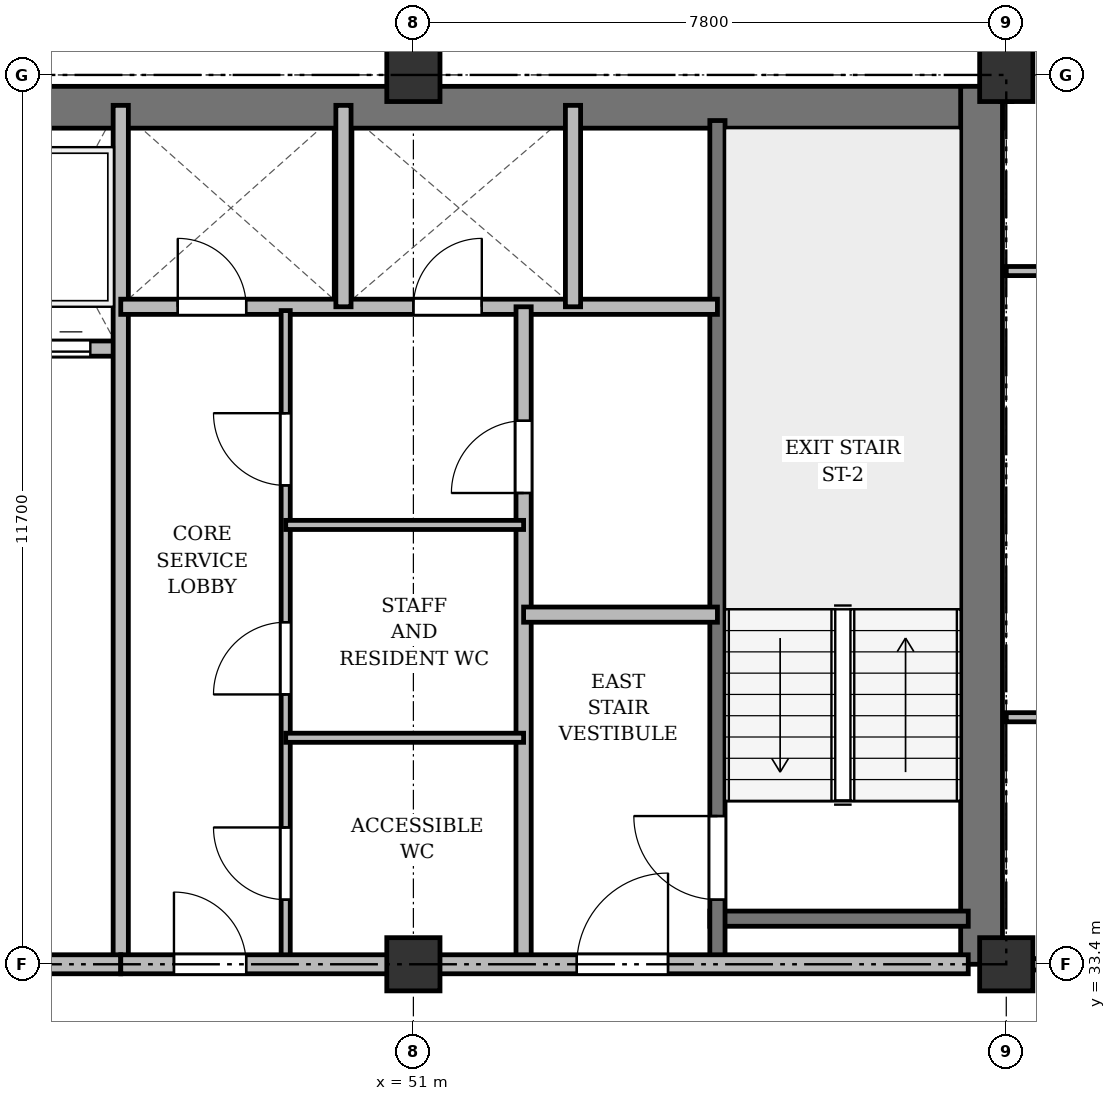
"""IFC4 building model, lengths in metres.
Left out: names, types, materials, properties, quantities, classifications, styles, units other than length and angle.
Written with IfcOpenShell. Run it as: python <this file> out.ifc"""

import sys

from ifc_helpers import new_model, si_unit, direction, frame, frame_2d, origin, origin_2d, place, context, subcontext, project, spatial, rectangle, extrude, source, transform, mapped, element, fill, save


model = new_model("IFC4")
c1 = context("Model", 3, precision=1e-05, world=origin(), true_north=direction((0.0, 1.0)))
c2 = subcontext(c1, "Body", "Model", "MODEL_VIEW")
j1 = project(units=[si_unit("LENGTHUNIT", "METRE"), si_unit("PLANEANGLEUNIT", "RADIAN")], contexts=[c1])
p1 = place(None, origin())
s1 = spatial("IfcSite", under=j1, at=p1, CompositionType="ELEMENT")
p2 = place(p1, origin())
s2 = spatial("IfcBuilding", under=s1, at=p2, CompositionType="ELEMENT")
p3 = place(p2, frame((0.0, 0.0, 219.3)))
s3 = spatial("IfcBuildingStorey", under=s2, at=p3, CompositionType="ELEMENT", Elevation=219.3)
m1 = source(origin(), c2, "Body", "SweptSolid", [
    extrude(rectangle(XDim=0.7, YDim=0.7, at=origin_2d()), origin(), (0.0, 0.0, 1.0), 3.6),
])
for number, where, z_axis, x_axis in (
    (1, (51.0, 33.4, 0.0), (0.0, 0.0, 1.0), (1.0, 0.0, 0.0)),
    (2, (51.0, 45.1, 0.0), (0.0, 0.0, 1.0), (1.0, 0.0, 0.0)),
    (3, (58.8, 33.4, 0.0), (0.0, 0.0, 1.0), (1.0, 0.0, 0.0)),
    (4, (58.8, 45.1, 0.0), (0.0, 0.0, 1.0), (1.0, 0.0, 0.0)),
):
    element("IfcColumn", number, at=place(p3, frame(where, z_axis=z_axis, x_axis=x_axis)), inside=s3, PredefinedType="COLUMN", context=c2, shape_type="MappedRepresentation", body=[
        mapped(m1, transform((0.0, 0.0, 0.0), x_axis=(1.0, 0.0, 0.0), y_axis=(0.0, 1.0, 0.0), z_axis=(0.0, 0.0, 1.0), scale=1.0)),
    ])
p4 = place(p3, frame((15.65, 44.675, 0.0), z_axis=(0.0, 0.0, 1.0), x_axis=(1.0, 0.0, 0.0)))
e5 = element("IfcWall", 5, at=p4, inside=s3, PredefinedType="SHEAR", context=c2, shape_type="SweptSolid", body=[
    extrude(rectangle(XDim=43.1, YDim=0.55, at=frame_2d((21.55, 0.0))), origin(), (0.0, 0.0, 1.0), 3.36),
])
p5 = place(p3, frame((58.475, 33.4, 0.0), z_axis=(0.0, 0.0, 1.0), x_axis=(0.0, 1.0, 0.0)))
e6 = element("IfcWall", 6, at=p5, inside=s3, PredefinedType="SHEAR", context=c2, shape_type="SweptSolid", body=[
    extrude(rectangle(XDim=11.55, YDim=0.55, at=frame_2d((5.775, 0.0))), origin(), (0.0, 0.0, 1.0), 3.36),
])
p6 = place(p3, frame((54.9, 34.0, 0.0), z_axis=(0.0, 0.0, 1.0), x_axis=(1.0, 0.0, 0.0)))
e7 = element("IfcWall", 7, at=p6, inside=s3, PredefinedType="SHEAR", context=c2, shape_type="SweptSolid", body=[
    extrude(rectangle(XDim=3.4, YDim=0.2, at=frame_2d((1.7, 0.0))), origin(), (0.0, 0.0, 1.0), 3.36),
])
p7 = place(p3, frame((55.0, 33.4, 0.0), z_axis=(0.0, 0.0, 1.0), x_axis=(0.0, 1.0, 0.0)))
e8 = element("IfcWall", 8, at=p7, inside=s3, PredefinedType="SHEAR", context=c2, shape_type="SweptSolid", body=[
    extrude(rectangle(XDim=11.1, YDim=0.2, at=frame_2d((5.55, 0.0))), origin(), (0.0, 0.0, 1.0), 3.36),
])
p8 = place(p7, frame((0.85, 0.0, 0.0)))
e9 = element("IfcOpeningElement", 9, at=p8, cuts=e8, PredefinedType="OPENING", context=c2, shape_type="SweptSolid", body=[
    extrude(rectangle(XDim=1.1, YDim=2.15, at=frame_2d((0.55, 1.075))), frame((0.0, 0.11, 0.0), z_axis=(0.0, -1.0, 0.0), x_axis=(1.0, 0.0, 0.0)), (0.0, 0.0, 1.0), 0.22),
])
p9 = place(p3, frame((40.25, 41.5, 0.0), z_axis=(0.0, 0.0, 1.0), x_axis=(1.0, 0.0, 0.0)))
e10 = element("IfcWall", 10, at=p9, inside=s3, PredefinedType="SOLIDWALL", context=c2, shape_type="SweptSolid", body=[
    extrude(rectangle(XDim=6.9, YDim=0.2, at=frame_2d((3.45, 0.0))), origin(), (0.0, 0.0, 1.0), 3.36),
])
p10 = place(p9, frame((0.35, 0.0, 0.0)))
e11 = element("IfcOpeningElement", 11, at=p10, cuts=e10, PredefinedType="OPENING", context=c2, shape_type="SweptSolid", body=[
    extrude(rectangle(XDim=1.05, YDim=2.15, at=frame_2d((0.525, 1.075))), frame((0.0, 0.11, 0.0), z_axis=(0.0, -1.0, 0.0), x_axis=(1.0, 0.0, 0.0)), (0.0, 0.0, 1.0), 0.22),
])
p11 = place(p9, frame((2.05, 0.0, 0.0)))
e12 = element("IfcOpeningElement", 12, at=p11, cuts=e10, PredefinedType="OPENING", context=c2, shape_type="SweptSolid", body=[
    extrude(rectangle(XDim=1.05, YDim=2.15, at=frame_2d((0.525, 1.075))), frame((0.0, 0.11, 0.0), z_axis=(0.0, -1.0, 0.0), x_axis=(1.0, 0.0, 0.0)), (0.0, 0.0, 1.0), 0.22),
])
p12 = place(p9, frame((3.75, 0.0, 0.0)))
e13 = element("IfcOpeningElement", 13, at=p12, cuts=e10, PredefinedType="OPENING", context=c2, shape_type="SweptSolid", body=[
    extrude(rectangle(XDim=1.05, YDim=2.15, at=frame_2d((0.525, 1.075))), frame((0.0, 0.11, 0.0), z_axis=(0.0, -1.0, 0.0), x_axis=(1.0, 0.0, 0.0)), (0.0, 0.0, 1.0), 0.22),
])
p13 = place(p9, frame((5.45, 0.0, 0.0)))
e14 = element("IfcOpeningElement", 14, at=p13, cuts=e10, PredefinedType="OPENING", context=c2, shape_type="SweptSolid", body=[
    extrude(rectangle(XDim=1.05, YDim=2.15, at=frame_2d((0.525, 1.075))), frame((0.0, 0.11, 0.0), z_axis=(0.0, -1.0, 0.0), x_axis=(1.0, 0.0, 0.0)), (0.0, 0.0, 1.0), 0.22),
])
p14 = place(p3, frame((47.15, 33.4, 0.0), z_axis=(0.0, 0.0, 1.0), x_axis=(0.0, 1.0, 0.0)))
e15 = element("IfcWall", 15, at=p14, inside=s3, PredefinedType="SOLIDWALL", context=c2, shape_type="SweptSolid", body=[
    extrude(rectangle(XDim=11.3, YDim=0.2, at=frame_2d((5.65, 0.0))), origin(), (0.0, 0.0, 1.0), 2.91),
])
p15 = place(p3, frame((33.3, 33.4, 0.0), z_axis=(0.0, 0.0, 1.0), x_axis=(1.0, 0.0, 0.0)))
e16 = element("IfcWall", 16, at=p15, inside=s3, PredefinedType="PARTITIONING", context=c2, shape_type="SweptSolid", body=[
    extrude(rectangle(XDim=13.85, YDim=0.25, at=frame_2d((6.925, 0.0))), origin(), (0.0, 0.0, 1.0), 2.91),
])
p16 = place(p15, frame((4.2, 0.0, 0.0)))
e17 = element("IfcOpeningElement", 17, at=p16, cuts=e16, PredefinedType="OPENING", context=c2, shape_type="SweptSolid", body=[
    extrude(rectangle(XDim=1.6, YDim=2.2, at=frame_2d((0.8, 1.1))), frame((0.0, 0.135, 0.0), z_axis=(0.0, -1.0, 0.0), x_axis=(1.0, 0.0, 0.0)), (0.0, 0.0, 1.0), 0.27),
])
p17 = place(p3, frame((47.15, 42.05, 0.0), z_axis=(0.0, 0.0, 1.0), x_axis=(1.0, 0.0, 0.0)))
e18 = element("IfcWall", 18, at=p17, inside=s3, PredefinedType="SOLIDWALL", context=c2, shape_type="SweptSolid", body=[
    extrude(rectangle(XDim=7.85, YDim=0.2, at=frame_2d((3.925, 0.0))), origin(), (0.0, 0.0, 1.0), 2.86),
])
p18 = place(p17, frame((0.75, 0.0, 0.0)))
e19 = element("IfcOpeningElement", 19, at=p18, cuts=e18, PredefinedType="OPENING", context=c2, shape_type="SweptSolid", body=[
    extrude(rectangle(XDim=0.9, YDim=2.1, at=frame_2d((0.45, 1.05))), frame((0.0, 0.11, 0.0), z_axis=(0.0, -1.0, 0.0), x_axis=(1.0, 0.0, 0.0)), (0.0, 0.0, 1.0), 0.22),
])
p19 = place(p17, frame((3.85, 0.0, 0.0)))
e20 = element("IfcOpeningElement", 20, at=p19, cuts=e18, PredefinedType="OPENING", context=c2, shape_type="SweptSolid", body=[
    extrude(rectangle(XDim=0.9, YDim=2.1, at=frame_2d((0.45, 1.05))), frame((0.0, 0.11, 0.0), z_axis=(0.0, -1.0, 0.0), x_axis=(1.0, 0.0, 0.0)), (0.0, 0.0, 1.0), 0.22),
])
for number, where, z_axis, x_axis in (
    (21, (50.08, 42.05, 0.0), (0.0, 0.0, 1.0), (0.0, 1.0, 0.0)),
    (22, (53.1, 42.05, 0.0), (0.0, 0.0, 1.0), (0.0, 1.0, 0.0)),
):
    element("IfcWall", number, at=place(p3, frame(where, z_axis=z_axis, x_axis=x_axis)), inside=s3, PredefinedType="SOLIDWALL", context=c2, shape_type="SweptSolid", body=[
        extrude(rectangle(XDim=2.65, YDim=0.2, at=frame_2d((1.325, 0.0))), origin(), (0.0, 0.0, 1.0), 3.36),
    ])
p20 = place(p3, frame((52.45, 33.4, 0.0), z_axis=(0.0, 0.0, 1.0), x_axis=(0.0, 1.0, 0.0)))
e23 = element("IfcWall", 23, at=p20, inside=s3, PredefinedType="PARTITIONING", context=c2, shape_type="SweptSolid", body=[
    extrude(rectangle(XDim=8.65, YDim=0.2, at=frame_2d((4.325, 0.0))), origin(), (0.0, 0.0, 1.0), 2.91),
])
p21 = place(p20, frame((6.2, 0.0, 0.0)))
e24 = element("IfcOpeningElement", 24, at=p21, cuts=e23, PredefinedType="OPENING", context=c2, shape_type="SweptSolid", body=[
    extrude(rectangle(XDim=0.95, YDim=2.15, at=frame_2d((0.475, 1.075))), frame((0.0, 0.11, 0.0), z_axis=(0.0, -1.0, 0.0), x_axis=(1.0, 0.0, 0.0)), (0.0, 0.0, 1.0), 0.22),
])
p22 = place(p3, frame((52.45, 38.0, 0.0), z_axis=(0.0, 0.0, 1.0), x_axis=(1.0, 0.0, 0.0)))
e25 = element("IfcWall", 25, at=p22, inside=s3, PredefinedType="PARTITIONING", context=c2, shape_type="SweptSolid", body=[
    extrude(rectangle(XDim=2.55, YDim=0.2, at=frame_2d((1.275, 0.0))), origin(), (0.0, 0.0, 1.0), 3.36),
])
p23 = place(p3, frame((49.32, 33.4, 0.0), z_axis=(0.0, 0.0, 1.0), x_axis=(0.0, 1.0, 0.0)))
e26 = element("IfcWall", 26, at=p23, inside=s3, PredefinedType="PARTITIONING", context=c2, shape_type="SweptSolid", body=[
    extrude(rectangle(XDim=8.6, YDim=0.12, at=frame_2d((4.3, 0.0))), origin(), (0.0, 0.0, 1.0), 2.91),
])
p24 = place(p23, frame((0.85, 0.0, 0.0)))
e27 = element("IfcOpeningElement", 27, at=p24, cuts=e26, PredefinedType="OPENING", context=c2, shape_type="SweptSolid", body=[
    extrude(rectangle(XDim=0.95, YDim=2.15, at=frame_2d((0.475, 1.075))), frame((0.0, 0.07, 0.0), z_axis=(0.0, -1.0, 0.0), x_axis=(1.0, 0.0, 0.0)), (0.0, 0.0, 1.0), 0.14),
])
p25 = place(p23, frame((3.55, 0.0, 0.0)))
e28 = element("IfcOpeningElement", 28, at=p25, cuts=e26, PredefinedType="OPENING", context=c2, shape_type="SweptSolid", body=[
    extrude(rectangle(XDim=0.95, YDim=2.15, at=frame_2d((0.475, 1.075))), frame((0.0, 0.07, 0.0), z_axis=(0.0, -1.0, 0.0), x_axis=(1.0, 0.0, 0.0)), (0.0, 0.0, 1.0), 0.14),
])
p26 = place(p23, frame((6.3, 0.0, 0.0)))
e29 = element("IfcOpeningElement", 29, at=p26, cuts=e26, PredefinedType="OPENING", context=c2, shape_type="SweptSolid", body=[
    extrude(rectangle(XDim=0.95, YDim=2.15, at=frame_2d((0.475, 1.075))), frame((0.0, 0.07, 0.0), z_axis=(0.0, -1.0, 0.0), x_axis=(1.0, 0.0, 0.0)), (0.0, 0.0, 1.0), 0.14),
])
for number, where, z_axis, x_axis in (
    (30, (49.32, 36.38, 0.0), (0.0, 0.0, 1.0), (1.0, 0.0, 0.0)),
    (31, (49.32, 39.18, 0.0), (0.0, 0.0, 1.0), (1.0, 0.0, 0.0)),
):
    element("IfcWall", number, at=place(p3, frame(where, z_axis=z_axis, x_axis=x_axis)), inside=s3, PredefinedType="PARTITIONING", context=c2, shape_type="SweptSolid", body=[
        extrude(rectangle(XDim=3.13, YDim=0.12, at=frame_2d((1.565, 0.0))), origin(), (0.0, 0.0, 1.0), 2.86),
    ])
p27 = place(p3, frame((47.15, 33.4, 0.0), z_axis=(0.0, 0.0, 1.0), x_axis=(1.0, 0.0, 0.0)))
e32 = element("IfcWall", 32, at=p27, inside=s3, PredefinedType="PARTITIONING", context=c2, shape_type="SweptSolid", body=[
    extrude(rectangle(XDim=11.15, YDim=0.25, at=frame_2d((5.575, 0.0))), origin(), (0.0, 0.0, 1.0), 2.91),
])
p28 = place(p27, frame((0.7, 0.0, 0.0)))
e33 = element("IfcOpeningElement", 33, at=p28, cuts=e32, PredefinedType="OPENING", context=c2, shape_type="SweptSolid", body=[
    extrude(rectangle(XDim=0.95, YDim=2.15, at=frame_2d((0.475, 1.075))), frame((0.0, 0.135, 0.0), z_axis=(0.0, -1.0, 0.0), x_axis=(1.0, 0.0, 0.0)), (0.0, 0.0, 1.0), 0.27),
])
p29 = place(p27, frame((6.0, 0.0, 0.0)))
e34 = element("IfcOpeningElement", 34, at=p29, cuts=e32, PredefinedType="OPENING", context=c2, shape_type="SweptSolid", body=[
    extrude(rectangle(XDim=1.2, YDim=2.15, at=frame_2d((0.6, 1.075))), frame((0.0, 0.135, 0.0), z_axis=(0.0, -1.0, 0.0), x_axis=(1.0, 0.0, 0.0)), (0.0, 0.0, 1.0), 0.27),
])
p30 = place(p3, frame((58.8, 36.65, 0.0), z_axis=(0.0, 0.0, 1.0), x_axis=(1.0, 0.0, 0.0)))
e35 = element("IfcWall", 35, at=p30, inside=s3, PredefinedType="PARTITIONING", context=c2, shape_type="SweptSolid", body=[
    extrude(rectangle(XDim=2.45, YDim=0.12, at=frame_2d((1.225, 0.0))), origin(), (0.0, 0.0, 1.0), 2.86),
])
p31 = place(p3, frame((58.8, 42.52, 0.0), z_axis=(0.0, 0.0, 1.0), x_axis=(1.0, 0.0, 0.0)))
e36 = element("IfcWall", 36, at=p31, inside=s3, PredefinedType="PARTITIONING", context=c2, shape_type="SweptSolid", body=[
    extrude(rectangle(XDim=3.675, YDim=0.12, at=frame_2d((1.837, 0.0))), origin(), (0.0, 0.0, 1.0), 2.86),
])
p32 = place(p31, frame((1.559, 0.0, 0.0)))
e37 = element("IfcOpeningElement", 37, at=p32, cuts=e36, PredefinedType="OPENING", context=c2, shape_type="SweptSolid", body=[
    extrude(rectangle(XDim=0.95, YDim=2.15, at=frame_2d((0.475, 1.075))), frame((0.0, 0.07, 0.0), z_axis=(0.0, -1.0, 0.0), x_axis=(1.0, 0.0, 0.0)), (0.0, 0.0, 1.0), 0.14),
])
p33 = place(p3, frame((58.8, 33.4, 0.0), z_axis=(0.0, 0.0, 1.0), x_axis=(1.0, 0.0, 0.0)))
e38 = element("IfcWall", 38, at=p33, inside=s3, PredefinedType="PARTITIONING", context=c2, shape_type="SweptSolid", body=[
    extrude(rectangle(XDim=7.35, YDim=0.15, at=frame_2d((3.675, 0.0))), origin(), (0.0, 0.0, 1.0), 2.91),
])
p34 = place(p33, frame((4.275, 0.0, 0.0)))
e39 = element("IfcOpeningElement", 39, at=p34, cuts=e38, PredefinedType="OPENING", context=c2, shape_type="SweptSolid", body=[
    extrude(rectangle(XDim=0.95, YDim=2.15, at=frame_2d((0.475, 1.075))), frame((0.0, 0.085, 0.0), z_axis=(0.0, -1.0, 0.0), x_axis=(1.0, 0.0, 0.0)), (0.0, 0.0, 1.0), 0.17),
])
p35 = place(p3, frame((58.8, 44.75, 0.0), z_axis=(0.0, 0.0, 1.0), x_axis=(0.0, 1.0, 0.0)))
e40 = element("IfcWall", 40, at=p35, inside=s3, PredefinedType="PARTITIONING", context=c2, shape_type="SweptSolid", body=[
    extrude(rectangle(XDim=3.61, YDim=0.15, at=frame_2d((1.805, 0.0))), origin(), (0.0, 0.0, 1.0), 2.86),
])
p36 = place(p35, frame((1.1, 0.0, 0.0)))
e41 = element("IfcOpeningElement", 41, at=p36, cuts=e40, PredefinedType="OPENING", context=c2, shape_type="SweptSolid", body=[
    extrude(rectangle(XDim=0.95, YDim=2.15, at=frame_2d((0.475, 1.075))), frame((0.0, 0.085, 0.0), z_axis=(0.0, -1.0, 0.0), x_axis=(1.0, 0.0, 0.0)), (0.0, 0.0, 1.0), 0.17),
])
m2 = source(origin(), c2, "Body", "SweptSolid", [
    extrude(rectangle(XDim=1.1, YDim=2.15, at=frame_2d((0.55, 1.075))), frame((0.0, 0.025, 0.0), z_axis=(0.0, -1.0, 0.0), x_axis=(1.0, 0.0, 0.0)), (0.0, 0.0, 1.0), 0.05),
])
p37 = place(p8, origin())
e42 = element("IfcDoor", 42, at=p37, inside=s3, OperationType="SINGLE_SWING_RIGHT", PredefinedType="DOOR", context=c2, shape_type="MappedRepresentation", body=[
    mapped(m2, transform((0.0, 0.0, 0.0), x_axis=(1.0, 0.0, 0.0), y_axis=(0.0, 1.0, 0.0), z_axis=(0.0, 0.0, 1.0), scale=1.0)),
])
fill(e9, e42)
m3 = source(origin(), c2, "Body", "SweptSolid", [
    extrude(rectangle(XDim=1.05, YDim=2.15, at=frame_2d((0.525, 1.075))), frame((0.0, 0.025, 0.0), z_axis=(0.0, -1.0, 0.0), x_axis=(1.0, 0.0, 0.0)), (0.0, 0.0, 1.0), 0.05),
])
p38 = place(p13, origin())
e43 = element("IfcDoor", 43, at=p38, inside=s3, OperationType="DOUBLE_DOOR_SLIDING", PredefinedType="DOOR", context=c2, shape_type="MappedRepresentation", body=[
    mapped(m3, transform((0.0, 0.0, 0.0), x_axis=(1.0, 0.0, 0.0), y_axis=(0.0, 1.0, 0.0), z_axis=(0.0, 0.0, 1.0), scale=1.0)),
])
fill(e14, e43)
m4 = source(origin(), c2, "Body", "SweptSolid", [
    extrude(rectangle(XDim=0.9, YDim=2.1, at=frame_2d((0.45, 1.05))), frame((0.0, 0.025, 0.0), z_axis=(0.0, -1.0, 0.0), x_axis=(1.0, 0.0, 0.0)), (0.0, 0.0, 1.0), 0.05),
])
p39 = place(p18, origin())
e44 = element("IfcDoor", 44, at=p39, inside=s3, OperationType="SINGLE_SWING_LEFT", PredefinedType="DOOR", context=c2, shape_type="MappedRepresentation", body=[
    mapped(m4, transform((0.0, 0.0, 0.0), x_axis=(1.0, 0.0, 0.0), y_axis=(0.0, 1.0, 0.0), z_axis=(0.0, 0.0, 1.0), scale=1.0)),
])
fill(e19, e44)
p40 = place(p19, origin())
e45 = element("IfcDoor", 45, at=p40, inside=s3, OperationType="SINGLE_SWING_RIGHT", PredefinedType="DOOR", context=c2, shape_type="MappedRepresentation", body=[
    mapped(m4, transform((0.0, 0.0, 0.0), x_axis=(1.0, 0.0, 0.0), y_axis=(0.0, 1.0, 0.0), z_axis=(0.0, 0.0, 1.0), scale=1.0)),
])
fill(e20, e45)
m5 = source(origin(), c2, "Body", "SweptSolid", [
    extrude(rectangle(XDim=0.95, YDim=2.15, at=frame_2d((0.475, 1.075))), frame((0.0, 0.025, 0.0), z_axis=(0.0, -1.0, 0.0), x_axis=(1.0, 0.0, 0.0)), (0.0, 0.0, 1.0), 0.05),
])
p41 = place(p21, origin())
e46 = element("IfcDoor", 46, at=p41, inside=s3, OperationType="SINGLE_SWING_LEFT", PredefinedType="DOOR", context=c2, shape_type="MappedRepresentation", body=[
    mapped(m5, transform((0.0, 0.0, 0.0), x_axis=(1.0, 0.0, 0.0), y_axis=(0.0, 1.0, 0.0), z_axis=(0.0, 0.0, 1.0), scale=1.0)),
])
fill(e24, e46)
p42 = place(p24, origin())
e47 = element("IfcDoor", 47, at=p42, inside=s3, OperationType="SINGLE_SWING_RIGHT", PredefinedType="DOOR", context=c2, shape_type="MappedRepresentation", body=[
    mapped(m5, transform((0.0, 0.0, 0.0), x_axis=(1.0, 0.0, 0.0), y_axis=(0.0, 1.0, 0.0), z_axis=(0.0, 0.0, 1.0), scale=1.0)),
])
fill(e27, e47)
p43 = place(p25, origin())
e48 = element("IfcDoor", 48, at=p43, inside=s3, OperationType="SINGLE_SWING_LEFT", PredefinedType="DOOR", context=c2, shape_type="MappedRepresentation", body=[
    mapped(m5, transform((0.0, 0.0, 0.0), x_axis=(1.0, 0.0, 0.0), y_axis=(0.0, 1.0, 0.0), z_axis=(0.0, 0.0, 1.0), scale=1.0)),
])
fill(e28, e48)
p44 = place(p26, origin())
e49 = element("IfcDoor", 49, at=p44, inside=s3, OperationType="SINGLE_SWING_RIGHT", PredefinedType="DOOR", context=c2, shape_type="MappedRepresentation", body=[
    mapped(m5, transform((0.0, 0.0, 0.0), x_axis=(1.0, 0.0, 0.0), y_axis=(0.0, 1.0, 0.0), z_axis=(0.0, 0.0, 1.0), scale=1.0)),
])
fill(e29, e49)
p45 = place(p28, origin())
e50 = element("IfcDoor", 50, at=p45, inside=s3, OperationType="SINGLE_SWING_LEFT", PredefinedType="DOOR", context=c2, shape_type="MappedRepresentation", body=[
    mapped(m5, transform((0.0, 0.0, 0.0), x_axis=(1.0, 0.0, 0.0), y_axis=(0.0, 1.0, 0.0), z_axis=(0.0, 0.0, 1.0), scale=1.0)),
])
fill(e33, e50)
m6 = source(origin(), c2, "Body", "SweptSolid", [
    extrude(rectangle(XDim=1.2, YDim=2.15, at=frame_2d((0.6, 1.075))), frame((0.0, 0.025, 0.0), z_axis=(0.0, -1.0, 0.0), x_axis=(1.0, 0.0, 0.0)), (0.0, 0.0, 1.0), 0.05),
])
p46 = place(p29, origin())
e51 = element("IfcDoor", 51, at=p46, inside=s3, OperationType="SINGLE_SWING_RIGHT", PredefinedType="DOOR", context=c2, shape_type="MappedRepresentation", body=[
    mapped(m6, transform((0.0, 0.0, 0.0), x_axis=(1.0, 0.0, 0.0), y_axis=(0.0, 1.0, 0.0), z_axis=(0.0, 0.0, 1.0), scale=1.0)),
])
fill(e34, e51)
save(model, sys.argv[1])
